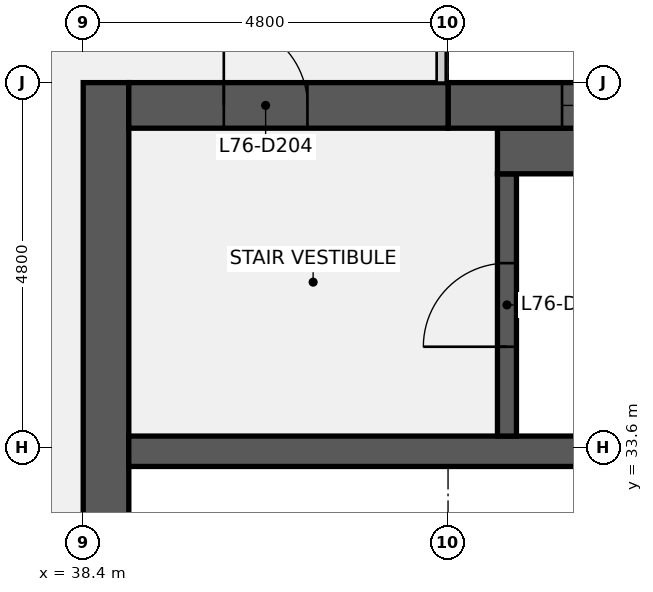
"""IFC4 building model, lengths in metres.
Left out: names, types, materials, properties, quantities, classifications, styles, units other than length and angle.
Written with IfcOpenShell. Run it as: python <this file> out.ifc"""

import sys

from ifc_helpers import new_model, si_unit, direction, frame, frame_2d, origin, place, context, subcontext, project, spatial, rectangle, extrude, element, fill, save


model = new_model("IFC4")
c1 = context("Model", 3, precision=1e-05, world=origin(), true_north=direction((0.0, 1.0)))
c2 = subcontext(c1, "Body", "Model", "MODEL_VIEW")
j1 = project(units=[si_unit("LENGTHUNIT", "METRE"), si_unit("PLANEANGLEUNIT", "RADIAN")], contexts=[c1])
p1 = place(None, origin())
s1 = spatial("IfcSite", under=j1, at=p1, CompositionType="ELEMENT")
p2 = place(p1, origin())
s2 = spatial("IfcBuilding", under=s1, at=p2, CompositionType="ELEMENT")
p3 = place(p2, frame((0.0, 0.0, 342.3)))
s3 = spatial("IfcBuildingStorey", under=s2, at=p3, CompositionType="ELEMENT", Elevation=342.3)
p4 = place(p3, frame((38.7, 9.6, 0.0), z_axis=(0.0, 0.0, 1.0), x_axis=(0.0, 1.0, 0.0)))
e1 = element("IfcWall", 1, at=p4, inside=s3, PredefinedType="SHEAR", context=c2, shape_type="SweptSolid", body=[
    extrude(rectangle(XDim=28.8, YDim=0.6, at=frame_2d((14.4, 0.0))), origin(), (0.0, 0.0, 1.0), 3.84),
])
p5 = place(p4, frame((8.7, 0.0, 0.0)))
e2 = element("IfcOpeningElement", 2, at=p5, cuts=e1, PredefinedType="OPENING", context=c2, shape_type="SweptSolid", body=[
    extrude(rectangle(XDim=1.8, YDim=2.1, at=frame_2d((0.9, 1.05))), frame((0.0, 0.31, 0.0), z_axis=(0.0, -1.0, 0.0), x_axis=(1.0, 0.0, 0.0)), (0.0, 0.0, 1.0), 0.62),
])
p6 = place(p4, frame((18.3, 0.0, 0.0)))
e3 = element("IfcOpeningElement", 3, at=p6, cuts=e1, PredefinedType="OPENING", context=c2, shape_type="SweptSolid", body=[
    extrude(rectangle(XDim=1.8, YDim=2.1, at=frame_2d((0.9, 1.05))), frame((0.0, 0.31, 0.0), z_axis=(0.0, -1.0, 0.0), x_axis=(1.0, 0.0, 0.0)), (0.0, 0.0, 1.0), 0.62),
])
p7 = place(p3, frame((39.0, 33.55, 0.0), z_axis=(0.0, 0.0, 1.0), x_axis=(1.0, 0.0, 0.0)))
e4 = element("IfcWall", 4, at=p7, inside=s3, PredefinedType="SHEAR", context=c2, shape_type="SweptSolid", body=[
    extrude(rectangle(XDim=18.0, YDim=0.4, at=frame_2d((9.0, 0.0))), origin(), (0.0, 0.0, 1.0), 3.84),
])
p8 = place(p3, frame((43.975, 33.75, 0.0), z_axis=(0.0, 0.0, 1.0), x_axis=(0.0, 1.0, 0.0)))
e5 = element("IfcWall", 5, at=p8, inside=s3, PredefinedType="SHEAR", context=c2, shape_type="SweptSolid", body=[
    extrude(rectangle(XDim=3.45, YDim=0.25, at=frame_2d((1.725, 0.0))), origin(), (0.0, 0.0, 1.0), 3.84),
])
p9 = place(p8, frame((1.175, 0.0, 0.0)))
e6 = element("IfcOpeningElement", 6, at=p9, cuts=e5, PredefinedType="OPENING", context=c2, shape_type="SweptSolid", body=[
    extrude(rectangle(XDim=1.1, YDim=2.1, at=frame_2d((0.55, 1.05))), frame((0.0, 0.135, 0.0), z_axis=(0.0, -1.0, 0.0), x_axis=(1.0, 0.0, 0.0)), (0.0, 0.0, 1.0), 0.27),
])
p10 = place(p3, frame((43.85, 37.5, 0.0), z_axis=(0.0, 0.0, 1.0), x_axis=(1.0, 0.0, 0.0)))
e7 = element("IfcWall", 7, at=p10, inside=s3, PredefinedType="SHEAR", context=c2, shape_type="SweptSolid", body=[
    extrude(rectangle(XDim=7.5, YDim=0.6, at=frame_2d((3.75, 0.0))), origin(), (0.0, 0.0, 1.0), 3.84),
])
p11 = place(p3, frame((43.2, 38.1, 0.0), z_axis=(0.0, 0.0, 1.0), x_axis=(1.0, 0.0, 0.0)))
e8 = element("IfcWall", 8, at=p11, inside=s3, PredefinedType="SHEAR", context=c2, shape_type="SweptSolid", body=[
    extrude(rectangle(XDim=13.8, YDim=0.6, at=frame_2d((6.9, 0.0))), origin(), (0.0, 0.0, 1.0), 3.84),
])
p12 = place(p11, frame((6.3, 0.0, 0.9)))
e9 = element("IfcOpeningElement", 9, at=p12, cuts=e8, PredefinedType="OPENING", context=c2, shape_type="SweptSolid", body=[
    extrude(rectangle(XDim=1.8, YDim=1.5, at=frame_2d((0.9, 0.75))), frame((0.0, 0.31, 0.0), z_axis=(0.0, -1.0, 0.0), x_axis=(1.0, 0.0, 0.0)), (0.0, 0.0, 1.0), 0.62),
])
p13 = place(p11, frame((1.5, 0.0, 0.9)))
e10 = element("IfcOpeningElement", 10, at=p13, cuts=e8, PredefinedType="OPENING", context=c2, shape_type="SweptSolid", body=[
    extrude(rectangle(XDim=1.8, YDim=1.5, at=frame_2d((0.9, 0.75))), frame((0.0, 0.31, 0.0), z_axis=(0.0, -1.0, 0.0), x_axis=(1.0, 0.0, 0.0)), (0.0, 0.0, 1.0), 0.62),
])
p14 = place(p3, frame((39.0, 38.1, 0.0), z_axis=(0.0, 0.0, 1.0), x_axis=(1.0, 0.0, 0.0)))
e11 = element("IfcWall", 11, at=p14, inside=s3, PredefinedType="SHEAR", context=c2, shape_type="SweptSolid", body=[
    extrude(rectangle(XDim=4.2, YDim=0.6, at=frame_2d((2.1, 0.0))), origin(), (0.0, 0.0, 1.0), 3.84),
])
p15 = place(p14, frame((1.25, 0.0, 0.0)))
e12 = element("IfcOpeningElement", 12, at=p15, cuts=e11, PredefinedType="OPENING", context=c2, shape_type="SweptSolid", body=[
    extrude(rectangle(XDim=1.1, YDim=2.1, at=frame_2d((0.55, 1.05))), frame((0.0, 0.31, 0.0), z_axis=(0.0, -1.0, 0.0), x_axis=(1.0, 0.0, 0.0)), (0.0, 0.0, 1.0), 0.62),
])
p16 = place(p9, origin())
e13 = element("IfcDoor", 13, at=p16, inside=s3, OperationType="SINGLE_SWING_LEFT", PredefinedType="DOOR", context=c2, shape_type="SweptSolid", body=[
    extrude(rectangle(XDim=1.1, YDim=2.1, at=frame_2d((0.55, 1.05))), frame((0.0, 0.025, 0.0), z_axis=(0.0, -1.0, 0.0), x_axis=(1.0, 0.0, 0.0)), (0.0, 0.0, 1.0), 0.05),
])
fill(e6, e13)
p17 = place(p15, origin())
e14 = element("IfcDoor", 14, at=p17, inside=s3, OperationType="SINGLE_SWING_LEFT", PredefinedType="DOOR", context=c2, shape_type="SweptSolid", body=[
    extrude(rectangle(XDim=1.1, YDim=2.1, at=frame_2d((0.55, 1.05))), frame((0.0, 0.025, 0.0), z_axis=(0.0, -1.0, 0.0), x_axis=(1.0, 0.0, 0.0)), (0.0, 0.0, 1.0), 0.05),
])
fill(e12, e14)
p18 = place(p13, origin())
e15 = element("IfcWindow", 15, at=p18, inside=s3, PartitioningType="SINGLE_PANEL", PredefinedType="WINDOW", context=c2, shape_type="SweptSolid", body=[
    extrude(rectangle(XDim=1.8, YDim=1.5, at=frame_2d((0.9, 0.75))), frame((0.0, 0.03, 0.0), z_axis=(0.0, -1.0, 0.0), x_axis=(1.0, 0.0, 0.0)), (0.0, 0.0, 1.0), 0.06),
])
fill(e10, e15)
save(model, sys.argv[1])
